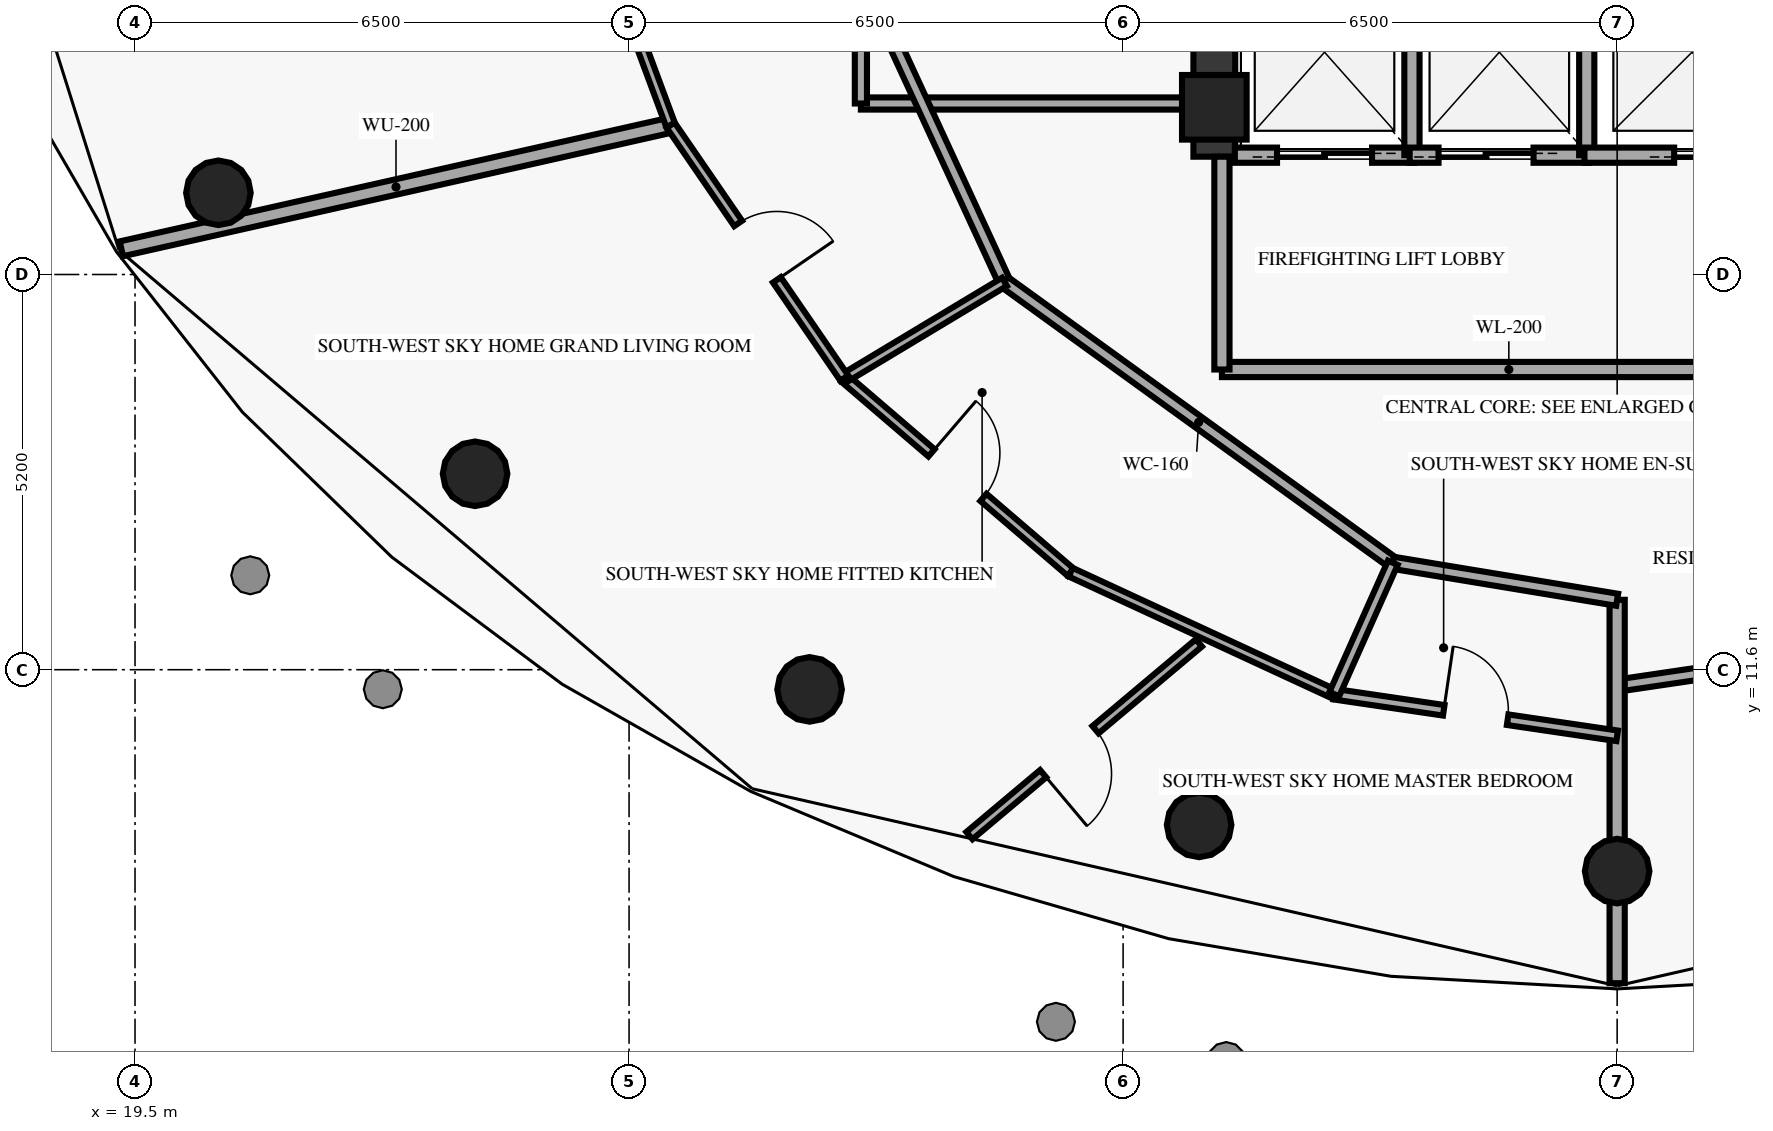
"""IFC4 building model, lengths in metres.
Left out: names, types, materials, properties, quantities, classifications, styles, units other than length and angle.
Written with IfcOpenShell. Run it as: python <this file> out.ifc"""

import sys

from ifc_helpers import new_model, si_unit, direction, frame, frame_2d, origin, origin_2d, place, context, subcontext, project, spatial, rectangle, circle, extrude, element, fill, save


model = new_model("IFC4")
c1 = context("Model", 3, precision=1e-05, world=origin(), true_north=direction((0.0, 1.0)))
c2 = subcontext(c1, "Body", "Model", "MODEL_VIEW")
j1 = project(units=[si_unit("LENGTHUNIT", "METRE"), si_unit("PLANEANGLEUNIT", "RADIAN")], contexts=[c1])
p1 = place(None, origin())
s1 = spatial("IfcSite", under=j1, at=p1, CompositionType="ELEMENT")
p2 = place(p1, origin())
s2 = spatial("IfcBuilding", under=s1, at=p2, CompositionType="ELEMENT")
p3 = place(p2, frame((0.0, 0.0, 251.95)))
s3 = spatial("IfcBuildingStorey", under=s2, at=p3, CompositionType="ELEMENT", Elevation=251.95)
p4 = place(p3, frame((33.7, 19.0, 0.0), z_axis=(0.0, 0.0, 1.0), x_axis=(1.0, 0.0, 0.0)))
e1 = element("IfcColumn", 1, at=p4, inside=s3, PredefinedType="PILASTER", context=c2, shape_type="SweptSolid", body=[
    extrude(rectangle(XDim=0.85, YDim=0.85, at=origin_2d()), origin(), (0.0, 0.0, 1.0), 3.39),
])
for number, where, z_axis, x_axis in (
    (2, (20.597, 17.875, 0.0), (0.0, 0.0, 1.0), (1.0, 0.0, 0.0)),
    (3, (23.974, 14.178, 0.0), (0.0, 0.0, 1.0), (1.0, 0.0, 0.0)),
    (4, (28.375, 11.341, 0.0), (0.0, 0.0, 1.0), (1.0, 0.0, 0.0)),
    (5, (33.5, 9.558, 0.0), (0.0, 0.0, 1.0), (1.0, 0.0, 0.0)),
    (6, (39.0, 8.95, 0.0), (0.0, 0.0, 1.0), (1.0, 0.0, 0.0)),
):
    element("IfcColumn", number, at=place(p3, frame(where, z_axis=z_axis, x_axis=x_axis)), inside=s3, PredefinedType="COLUMN", context=c2, shape_type="SweptSolid", body=[
        extrude(circle(Radius=0.425, at=origin_2d()), origin(), (0.0, 0.0, 1.0), 3.39),
    ])
p5 = place(p3, frame((33.7, 18.35, 0.0), z_axis=(0.0, 0.0, 1.0), x_axis=(0.0, 1.0, 0.0)))
e7 = element("IfcWall", 7, at=p5, inside=s3, PredefinedType="SHEAR", context=c2, shape_type="SweptSolid", body=[
    extrude(rectangle(XDim=2.95, YDim=0.55, at=frame_2d((1.475, 0.0))), origin(), (0.0, 0.0, 1.0), 3.39),
])
p6 = place(p3, frame((33.97, 18.37, 0.0), z_axis=(0.0, 0.0, 1.0), x_axis=(1.0, 0.0, 0.0)))
e8 = element("IfcWall", 8, at=p6, inside=s3, PredefinedType="SOLIDWALL", context=c2, shape_type="SweptSolid", body=[
    extrude(rectangle(XDim=2.36, YDim=0.2, at=frame_2d((1.18, 0.0))), origin(), (0.0, 0.0, 1.0), 3.39),
])
p7 = place(p6, frame((0.555, 0.0, 0.0)))
e9 = element("IfcOpeningElement", 9, at=p7, cuts=e8, PredefinedType="OPENING", context=c2, shape_type="SweptSolid", body=[
    extrude(rectangle(XDim=1.25, YDim=2.2, at=frame_2d((0.625, 1.1))), frame((0.0, 0.11, 0.0), z_axis=(0.0, -1.0, 0.0), x_axis=(1.0, 0.0, 0.0)), (0.0, 0.0, 1.0), 0.22),
])
p8 = place(p3, frame((36.3, 18.37, 0.0), z_axis=(0.0, 0.0, 1.0), x_axis=(0.0, 1.0, 0.0)))
e10 = element("IfcWall", 10, at=p8, inside=s3, PredefinedType="SOLIDWALL", context=c2, shape_type="SweptSolid", body=[
    extrude(rectangle(XDim=2.71, YDim=0.2, at=frame_2d((1.355, 0.0))), origin(), (0.0, 0.0, 1.0), 3.39),
])
p9 = place(p3, frame((36.27, 18.37, 0.0), z_axis=(0.0, 0.0, 1.0), x_axis=(1.0, 0.0, 0.0)))
e11 = element("IfcWall", 11, at=p9, inside=s3, PredefinedType="SOLIDWALL", context=c2, shape_type="SweptSolid", body=[
    extrude(rectangle(XDim=2.36, YDim=0.2, at=frame_2d((1.18, 0.0))), origin(), (0.0, 0.0, 1.0), 3.39),
])
p10 = place(p9, frame((0.38, 0.0, 0.0)))
e12 = element("IfcOpeningElement", 12, at=p10, cuts=e11, PredefinedType="OPENING", context=c2, shape_type="SweptSolid", body=[
    extrude(rectangle(XDim=1.25, YDim=2.2, at=frame_2d((0.625, 1.1))), frame((0.0, 0.11, 0.0), z_axis=(0.0, -1.0, 0.0), x_axis=(1.0, 0.0, 0.0)), (0.0, 0.0, 1.0), 0.22),
])
p11 = place(p3, frame((38.6, 18.37, 0.0), z_axis=(0.0, 0.0, 1.0), x_axis=(0.0, 1.0, 0.0)))
e13 = element("IfcWall", 13, at=p11, inside=s3, PredefinedType="SOLIDWALL", context=c2, shape_type="SweptSolid", body=[
    extrude(rectangle(XDim=2.71, YDim=0.2, at=frame_2d((1.355, 0.0))), origin(), (0.0, 0.0, 1.0), 3.39),
])
p12 = place(p3, frame((38.57, 18.37, 0.0), z_axis=(0.0, 0.0, 1.0), x_axis=(1.0, 0.0, 0.0)))
e14 = element("IfcWall", 14, at=p12, inside=s3, PredefinedType="SOLIDWALL", context=c2, shape_type="SweptSolid", body=[
    extrude(rectangle(XDim=2.83, YDim=0.2, at=frame_2d((1.415, 0.0))), origin(), (0.0, 0.0, 1.0), 3.39),
])
p13 = place(p12, frame((1.18, 0.0, 0.0)))
e15 = element("IfcOpeningElement", 15, at=p13, cuts=e14, PredefinedType="OPENING", context=c2, shape_type="SweptSolid", body=[
    extrude(rectangle(XDim=1.35, YDim=2.02, at=frame_2d((0.675, 1.01))), frame((0.0, 0.11, 0.0), z_axis=(0.0, -1.0, 0.0), x_axis=(1.0, 0.0, 0.0)), (0.0, 0.0, 1.0), 0.22),
])
p14 = place(p3, frame((29.05, 19.05, 0.0), z_axis=(0.0, 0.0, 1.0), x_axis=(1.0, 0.0, 0.0)))
e16 = element("IfcWall", 16, at=p14, inside=s3, PredefinedType="PARTITIONING", context=c2, shape_type="SweptSolid", body=[
    extrude(rectangle(XDim=4.65, YDim=0.16, at=frame_2d((2.325, 0.0))), origin(), (0.0, 0.0, 1.0), 3.39),
])
p15 = place(p3, frame((29.05, 19.05, 0.0), z_axis=(0.0, 0.0, 1.0), x_axis=(0.0, 1.0, 0.0)))
e17 = element("IfcWall", 17, at=p15, inside=s3, PredefinedType="PARTITIONING", context=c2, shape_type="SweptSolid", body=[
    extrude(rectangle(XDim=7.07, YDim=0.16, at=frame_2d((3.535, 0.0))), origin(), (0.0, 0.0, 1.0), 3.39),
])
p16 = place(p3, frame((33.8, 15.55, 0.0), z_axis=(0.0, 0.0, 1.0), x_axis=(1.0, 0.0, 0.0)))
e18 = element("IfcWall", 18, at=p16, inside=s3, PredefinedType="SOLIDWALL", context=c2, shape_type="SweptSolid", body=[
    extrude(rectangle(XDim=7.55, YDim=0.2, at=frame_2d((3.775, 0.0))), origin(), (0.0, 0.0, 1.0), 3.39),
])
p17 = place(p3, frame((33.8, 15.55, 0.0), z_axis=(0.0, 0.0, 1.0), x_axis=(0.0, 1.0, 0.0)))
e19 = element("IfcWall", 19, at=p17, inside=s3, PredefinedType="SOLIDWALL", context=c2, shape_type="SweptSolid", body=[
    extrude(rectangle(XDim=2.8, YDim=0.2, at=frame_2d((1.4, 0.0))), origin(), (0.0, 0.0, 1.0), 3.39),
])
p18 = place(p3, frame((42.554, 11.915, 0.0), z_axis=(0.0, 0.0, 1.0), x_axis=(-0.989258488255, -0.146176754018, 0.0)))
e20 = element("IfcWall", 20, at=p18, inside=s3, PredefinedType="PARTITIONING", context=c2, shape_type="SweptSolid", body=[
    extrude(rectangle(XDim=3.593, YDim=0.16, at=frame_2d((1.796, 0.0))), origin(), (0.0, 0.0, 1.0), 3.39),
])
p19 = place(p18, frame((1.296, 0.0, 0.0)))
e21 = element("IfcOpeningElement", 21, at=p19, cuts=e20, PredefinedType="OPENING", context=c2, shape_type="SweptSolid", body=[
    extrude(rectangle(XDim=1.0, YDim=2.02, at=frame_2d((0.5, 1.01))), frame((0.0, 0.09, 0.0), z_axis=(0.0, -1.0, 0.0), x_axis=(1.0, 0.0, 0.0)), (0.0, 0.0, 1.0), 0.18),
])
p20 = place(p3, frame((39.0, 12.52, 0.0), z_axis=(0.0, 0.0, 1.0), x_axis=(0.0, -1.0, 0.0)))
e22 = element("IfcWall", 22, at=p20, inside=s3, PredefinedType="PARTITIONING", context=c2, shape_type="SweptSolid", body=[
    extrude(rectangle(XDim=3.57, YDim=0.2, at=frame_2d((1.785, 0.0))), origin(), (0.0, 0.0, 1.0), 2.19),
])
p21 = place(p3, frame((39.0, 8.95, 0.0), z_axis=(0.0, 0.0, 1.0), x_axis=(0.0, -1.0, 0.0)))
e23 = element("IfcWall", 23, at=p21, inside=s3, PredefinedType="PARTITIONING", context=c2, shape_type="SweptSolid", body=[
    extrude(rectangle(XDim=1.475, YDim=0.2, at=frame_2d((0.737, 0.0))), origin(), (0.0, 0.0, 1.0), 3.39),
])
p22 = place(p3, frame((27.988, 23.104, 0.0), z_axis=(0.0, 0.0, 1.0), x_axis=(0.418656179426, -0.908144814128, 0.0)))
e24 = element("IfcWall", 24, at=p22, inside=s3, PredefinedType="PARTITIONING", context=c2, shape_type="SweptSolid", body=[
    extrude(rectangle(XDim=7.049, YDim=0.16, at=frame_2d((3.524, 0.0))), origin(), (0.0, 0.0, 1.0), 3.39),
])
p23 = place(p3, frame((30.939, 16.703, 0.0), z_axis=(0.0, 0.0, 1.0), x_axis=(0.810290119061, -0.586028943784, 0.0)))
e25 = element("IfcWall", 25, at=p23, inside=s3, PredefinedType="PARTITIONING", context=c2, shape_type="SweptSolid", body=[
    extrude(rectangle(XDim=6.306, YDim=0.16, at=frame_2d((3.153, 0.0))), origin(), (0.0, 0.0, 1.0), 3.39),
])
p24 = place(p3, frame((36.049, 13.007, 0.0), z_axis=(0.0, 0.0, 1.0), x_axis=(0.986650832406, -0.162850038111, 0.0)))
e26 = element("IfcWall", 26, at=p24, inside=s3, PredefinedType="PARTITIONING", context=c2, shape_type="SweptSolid", body=[
    extrude(rectangle(XDim=2.991, YDim=0.16, at=frame_2d((1.496, 0.0))), origin(), (0.0, 0.0, 1.0), 3.39),
])
p25 = place(p3, frame((26.547, 18.765, 0.0), z_axis=(0.0, 0.0, 1.0), x_axis=(-0.975584694012, -0.219623552493, 0.0)))
e27 = element("IfcWall", 27, at=p25, inside=s3, PredefinedType="PARTITIONING", context=c2, shape_type="SweptSolid", body=[
    extrude(rectangle(XDim=7.408, YDim=0.2, at=frame_2d((3.704, 0.0))), origin(), (0.0, 0.0, 1.0), 3.39),
])
p26 = place(p3, frame((25.11, 22.641, 0.0), z_axis=(0.0, 0.0, 1.0), x_axis=(0.347606700796, -0.937640432982, 0.0)))
e28 = element("IfcWall", 28, at=p26, inside=s3, PredefinedType="PARTITIONING", context=c2, shape_type="SweptSolid", body=[
    extrude(rectangle(XDim=4.134, YDim=0.125, at=frame_2d((2.067, 0.0))), origin(), (0.0, 0.0, 1.0), 3.39),
])
p27 = place(p3, frame((31.81, 12.883, 0.0), z_axis=(0.0, 0.0, 1.0), x_axis=(-0.759085259689, 0.650991220004, 0.0)))
e29 = element("IfcWall", 29, at=p27, inside=s3, PredefinedType="PARTITIONING", context=c2, shape_type="SweptSolid", body=[
    extrude(rectangle(XDim=3.923, YDim=0.125, at=frame_2d((1.961, 0.0))), origin(), (0.0, 0.0, 1.0), 3.39),
])
p28 = place(p27, frame((1.512, 0.0, 0.0)))
e30 = element("IfcOpeningElement", 30, at=p28, cuts=e29, PredefinedType="OPENING", context=c2, shape_type="SweptSolid", body=[
    extrude(rectangle(XDim=0.9, YDim=2.02, at=frame_2d((0.45, 1.01))), frame((0.0, 0.073, 0.0), z_axis=(0.0, -1.0, 0.0), x_axis=(1.0, 0.0, 0.0)), (0.0, 0.0, 1.0), 0.145),
])
p29 = place(p3, frame((31.81, 12.883, 0.0), z_axis=(0.0, 0.0, 1.0), x_axis=(0.907525084777, -0.419997881543, 0.0)))
e31 = element("IfcWall", 31, at=p29, inside=s3, PredefinedType="PARTITIONING", context=c2, shape_type="SweptSolid", body=[
    extrude(rectangle(XDim=3.821, YDim=0.125, at=frame_2d((1.911, 0.0))), origin(), (0.0, 0.0, 1.0), 3.39),
])
p30 = place(p3, frame((39.0, 10.73, 0.0), z_axis=(0.0, 0.0, 1.0), x_axis=(-0.989330267414, 0.145690157451, 0.0)))
e32 = element("IfcWall", 32, at=p30, inside=s3, PredefinedType="PARTITIONING", context=c2, shape_type="SweptSolid", body=[
    extrude(rectangle(XDim=3.762, YDim=0.14, at=frame_2d((1.881, 0.0))), origin(), (0.0, 0.0, 1.0), 2.85),
])
p31 = place(p30, frame((1.456, 0.0, 0.0)))
e33 = element("IfcOpeningElement", 33, at=p31, cuts=e32, PredefinedType="OPENING", context=c2, shape_type="SweptSolid", body=[
    extrude(rectangle(XDim=0.85, YDim=2.02, at=frame_2d((0.425, 1.01))), frame((0.0, 0.08, 0.0), z_axis=(0.0, -1.0, 0.0), x_axis=(1.0, 0.0, 0.0)), (0.0, 0.0, 1.0), 0.16),
])
p32 = place(p3, frame((30.939, 16.703, 0.0), z_axis=(0.0, 0.0, 1.0), x_axis=(-0.857186030305, -0.515006902333, 0.0)))
e34 = element("IfcWall", 34, at=p32, inside=s3, PredefinedType="PARTITIONING", context=c2, shape_type="SweptSolid", body=[
    extrude(rectangle(XDim=2.458, YDim=0.125, at=frame_2d((1.229, 0.0))), origin(), (0.0, 0.0, 1.0), 3.39),
])
p33 = place(p3, frame((36.049, 13.007, 0.0), z_axis=(0.0, 0.0, 1.0), x_axis=(-0.407262922325, -0.913310961338, 0.0)))
e35 = element("IfcWall", 35, at=p33, inside=s3, PredefinedType="PARTITIONING", context=c2, shape_type="SweptSolid", body=[
    extrude(rectangle(XDim=1.893, YDim=0.14, at=frame_2d((0.947, 0.0))), origin(), (0.0, 0.0, 1.0), 3.39),
])
p34 = place(p3, frame((28.832, 15.437, 0.0), z_axis=(0.0, 0.0, 1.0), x_axis=(-0.566023066777, 0.824389403059, 0.0)))
e36 = element("IfcWall", 36, at=p34, inside=s3, PredefinedType="PARTITIONING", context=c2, shape_type="SweptSolid", body=[
    extrude(rectangle(XDim=4.037, YDim=0.125, at=frame_2d((2.019, 0.0))), origin(), (0.0, 0.0, 1.0), 3.39),
])
p35 = place(p34, frame((1.568, 0.0, 0.0)))
e37 = element("IfcOpeningElement", 37, at=p35, cuts=e36, PredefinedType="OPENING", context=c2, shape_type="SweptSolid", body=[
    extrude(rectangle(XDim=0.9, YDim=2.02, at=frame_2d((0.45, 1.01))), frame((0.0, 0.073, 0.0), z_axis=(0.0, -1.0, 0.0), x_axis=(1.0, 0.0, 0.0)), (0.0, 0.0, 1.0), 0.145),
])
p36 = place(p3, frame((33.497, 11.953, 0.0), z_axis=(0.0, 0.0, 1.0), x_axis=(-0.765718282832, -0.643176112225, 0.0)))
e38 = element("IfcWall", 38, at=p36, inside=s3, PredefinedType="PARTITIONING", context=c2, shape_type="SweptSolid", body=[
    extrude(rectangle(XDim=3.943, YDim=0.125, at=frame_2d((1.971, 0.0))), origin(), (0.0, 0.0, 1.0), 3.39),
])
p37 = place(p36, frame((1.776, 0.0, 0.0)))
e39 = element("IfcOpeningElement", 39, at=p37, cuts=e38, PredefinedType="OPENING", context=c2, shape_type="SweptSolid", body=[
    extrude(rectangle(XDim=0.9, YDim=2.02, at=frame_2d((0.45, 1.01))), frame((0.0, 0.073, 0.0), z_axis=(0.0, -1.0, 0.0), x_axis=(1.0, 0.0, 0.0)), (0.0, 0.0, 1.0), 0.145),
])
p38 = place(p7, origin())
e40 = element("IfcDoor", 40, at=p38, inside=s3, OperationType="DOUBLE_DOOR_SLIDING", PredefinedType="DOOR", context=c2, shape_type="SweptSolid", body=[
    extrude(rectangle(XDim=1.25, YDim=2.2, at=frame_2d((0.625, 1.1))), frame((0.0, 0.025, 0.0), z_axis=(0.0, -1.0, 0.0), x_axis=(1.0, 0.0, 0.0)), (0.0, 0.0, 1.0), 0.05),
])
fill(e9, e40)
p39 = place(p10, origin())
e41 = element("IfcDoor", 41, at=p39, inside=s3, OperationType="DOUBLE_DOOR_SLIDING", PredefinedType="DOOR", context=c2, shape_type="SweptSolid", body=[
    extrude(rectangle(XDim=1.25, YDim=2.2, at=frame_2d((0.625, 1.1))), frame((0.0, 0.025, 0.0), z_axis=(0.0, -1.0, 0.0), x_axis=(1.0, 0.0, 0.0)), (0.0, 0.0, 1.0), 0.05),
])
fill(e12, e41)
p40 = place(p13, origin())
e42 = element("IfcDoor", 42, at=p40, inside=s3, OperationType="DOUBLE_DOOR_SLIDING", PredefinedType="DOOR", context=c2, shape_type="SweptSolid", body=[
    extrude(rectangle(XDim=1.35, YDim=2.02, at=frame_2d((0.675, 1.01))), frame((0.0, 0.025, 0.0), z_axis=(0.0, -1.0, 0.0), x_axis=(1.0, 0.0, 0.0)), (0.0, 0.0, 1.0), 0.05),
])
fill(e15, e42)
p41 = place(p28, origin())
e43 = element("IfcDoor", 43, at=p41, inside=s3, OperationType="SINGLE_SWING_RIGHT", PredefinedType="DOOR", context=c2, shape_type="SweptSolid", body=[
    extrude(rectangle(XDim=0.9, YDim=2.02, at=frame_2d((0.45, 1.01))), frame((0.0, 0.025, 0.0), z_axis=(0.0, -1.0, 0.0), x_axis=(1.0, 0.0, 0.0)), (0.0, 0.0, 1.0), 0.05),
])
fill(e30, e43)
p42 = place(p31, origin())
e44 = element("IfcDoor", 44, at=p42, inside=s3, OperationType="SINGLE_SWING_RIGHT", PredefinedType="DOOR", context=c2, shape_type="SweptSolid", body=[
    extrude(rectangle(XDim=0.85, YDim=2.02, at=frame_2d((0.425, 1.01))), frame((0.0, 0.025, 0.0), z_axis=(0.0, -1.0, 0.0), x_axis=(1.0, 0.0, 0.0)), (0.0, 0.0, 1.0), 0.05),
])
fill(e33, e44)
p43 = place(p35, origin())
e45 = element("IfcDoor", 45, at=p43, inside=s3, OperationType="SINGLE_SWING_LEFT", PredefinedType="DOOR", context=c2, shape_type="SweptSolid", body=[
    extrude(rectangle(XDim=0.9, YDim=2.02, at=frame_2d((0.45, 1.01))), frame((0.0, 0.025, 0.0), z_axis=(0.0, -1.0, 0.0), x_axis=(1.0, 0.0, 0.0)), (0.0, 0.0, 1.0), 0.05),
])
fill(e37, e45)
p44 = place(p37, origin())
e46 = element("IfcDoor", 46, at=p44, inside=s3, OperationType="SINGLE_SWING_RIGHT", PredefinedType="DOOR", context=c2, shape_type="SweptSolid", body=[
    extrude(rectangle(XDim=0.9, YDim=2.02, at=frame_2d((0.45, 1.01))), frame((0.0, 0.025, 0.0), z_axis=(0.0, -1.0, 0.0), x_axis=(1.0, 0.0, 0.0)), (0.0, 0.0, 1.0), 0.05),
])
fill(e39, e46)
save(model, sys.argv[1])
